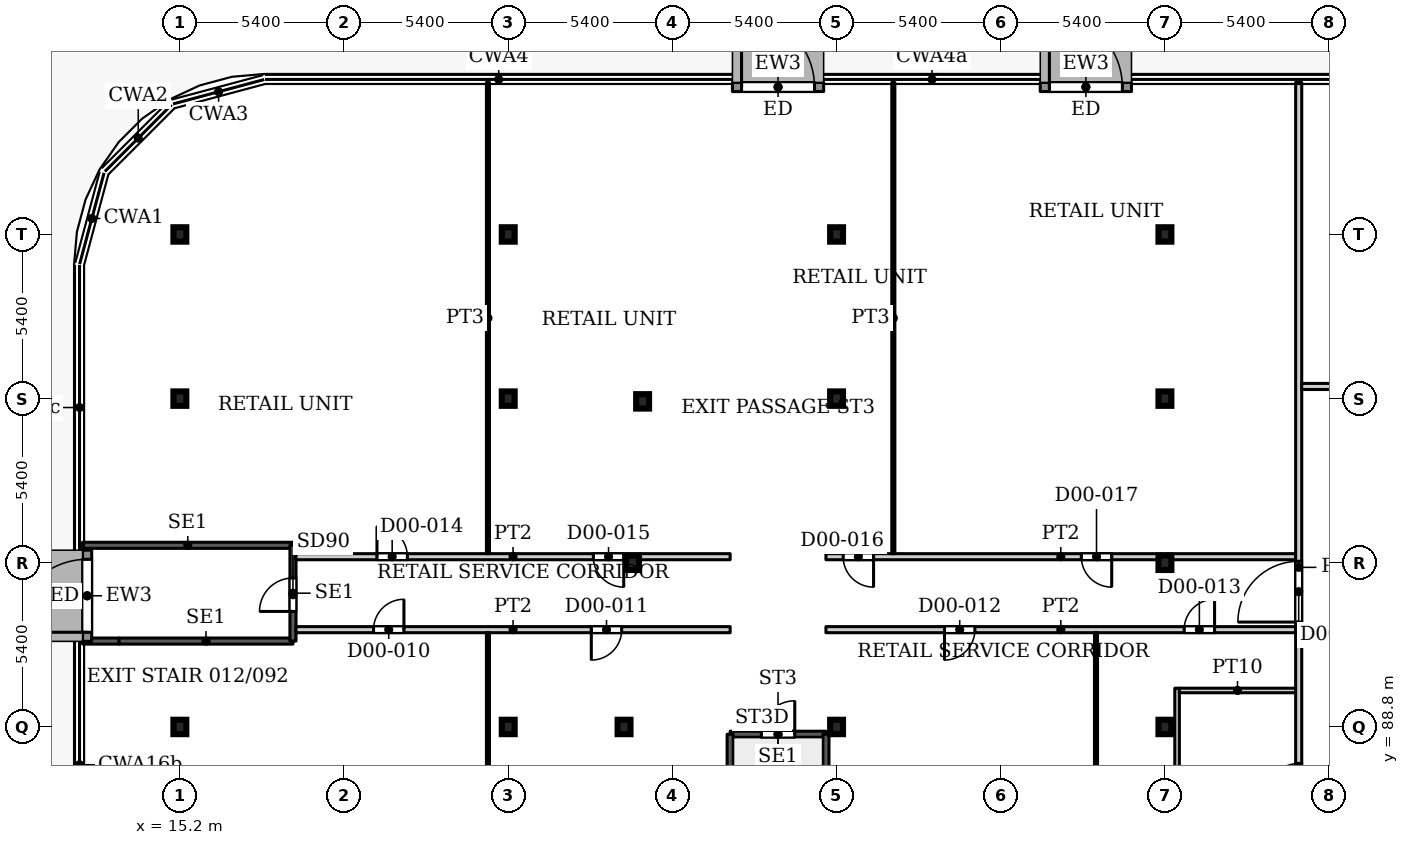
"""IFC4 building model, lengths in metres.
Left out: names, types, materials, properties, quantities, classifications, styles, units other than length and angle.
Written with IfcOpenShell. Run it as: python <this file> out.ifc"""

import sys

from ifc_helpers import new_model, si_unit, direction, frame, frame_2d, origin, origin_2d, place, context, subcontext, project, spatial, rectangle, i_section, extrude, source, transform, mapped, element, fill, save


model = new_model("IFC4")
c1 = context("Model", 3, precision=1e-05, world=origin(), true_north=direction((0.0, 1.0)))
c2 = subcontext(c1, "Body", "Model", "MODEL_VIEW")
j1 = project(units=[si_unit("LENGTHUNIT", "METRE"), si_unit("PLANEANGLEUNIT", "RADIAN")], contexts=[c1])
p1 = place(None, origin())
s1 = spatial("IfcSite", under=j1, at=p1, CompositionType="ELEMENT")
p2 = place(p1, origin())
s2 = spatial("IfcBuilding", under=s1, at=p2, CompositionType="ELEMENT")
p3 = place(p2, origin())
s3 = spatial("IfcBuildingStorey", under=s2, at=p3, CompositionType="ELEMENT", Elevation=0.0)
for number, where, z_axis, x_axis in (
    (1, (15.2, 88.8, 0.0), (0.0, 0.0, 1.0), (1.0, 0.0, 0.0)),
    (2, (26.0, 88.8, 0.0), (0.0, 0.0, 1.0), (1.0, 0.0, 0.0)),
    (3, (36.8, 88.8, 0.0), (0.0, 0.0, 1.0), (1.0, 0.0, 0.0)),
    (4, (47.6, 88.8, 0.0), (0.0, 0.0, 1.0), (1.0, 0.0, 0.0)),
    (5, (15.2, 99.6, 0.0), (0.0, 0.0, 1.0), (1.0, 0.0, 0.0)),
    (6, (26.0, 99.6, 0.0), (0.0, 0.0, 1.0), (1.0, 0.0, 0.0)),
    (7, (36.8, 99.6, 0.0), (0.0, 0.0, 1.0), (1.0, 0.0, 0.0)),
    (8, (47.6, 99.6, 0.0), (0.0, 0.0, 1.0), (1.0, 0.0, 0.0)),
    (9, (15.2, 105.0, 0.0), (0.0, 0.0, 1.0), (1.0, 0.0, 0.0)),
    (10, (26.0, 105.0, 0.0), (0.0, 0.0, 1.0), (1.0, 0.0, 0.0)),
    (11, (36.8, 105.0, 0.0), (0.0, 0.0, 1.0), (1.0, 0.0, 0.0)),
    (12, (47.6, 105.0, 0.0), (0.0, 0.0, 1.0), (1.0, 0.0, 0.0)),
    (13, (29.81, 88.8, 0.0), (0.0, 0.0, 1.0), (1.0, 0.0, 0.0)),
    (14, (30.09, 94.2, 0.0), (0.0, 0.0, 1.0), (1.0, 0.0, 0.0)),
    (15, (47.6, 94.2, 0.0), (0.0, 0.0, 1.0), (1.0, 0.0, 0.0)),
    (16, (30.42, 99.51, 0.0), (0.0, 0.0, 1.0), (1.0, 0.0, 0.0)),
):
    element("IfcColumn", number, at=place(p3, frame(where, z_axis=z_axis, x_axis=x_axis)), inside=s3, PredefinedType="COLUMN", context=c2, shape_type="SweptSolid", body=[
        extrude(i_section(OverallWidth=0.424, OverallDepth=0.474, WebThickness=0.048, FlangeThickness=0.077, FilletRadius=0.014, at=origin_2d()), origin(), (0.0, 0.0, 1.0), 7.5),
    ])
p4 = place(p3, frame((33.375, 109.85, 0.0), z_axis=(0.0, 0.0, 1.0), x_axis=(1.0, 0.0, 0.0)))
e17 = element("IfcWall", 17, at=p4, inside=s3, PredefinedType="SOLIDWALL", context=c2, shape_type="SweptSolid", body=[
    extrude(rectangle(XDim=3.0, YDim=0.3, at=frame_2d((1.5, 0.0))), origin(), (0.0, 0.0, 1.0), 7.25),
])
p5 = place(p4, frame((0.3, 0.0, 0.0)))
e18 = element("IfcOpeningElement", 18, at=p5, cuts=e17, PredefinedType="OPENING", context=c2, shape_type="SweptSolid", body=[
    extrude(rectangle(XDim=2.4, YDim=2.7, at=frame_2d((1.2, 1.35))), frame((0.0, 0.16, 0.0), z_axis=(0.0, -1.0, 0.0), x_axis=(1.0, 0.0, 0.0)), (0.0, 0.0, 1.0), 0.32),
])
p6 = place(p3, frame((43.5, 109.85, 0.0), z_axis=(0.0, 0.0, 1.0), x_axis=(1.0, 0.0, 0.0)))
e19 = element("IfcWall", 19, at=p6, inside=s3, PredefinedType="SOLIDWALL", context=c2, shape_type="SweptSolid", body=[
    extrude(rectangle(XDim=3.0, YDim=0.3, at=frame_2d((1.5, 0.0))), origin(), (0.0, 0.0, 1.0), 7.25),
])
p7 = place(p6, frame((0.3, 0.0, 0.0)))
e20 = element("IfcOpeningElement", 20, at=p7, cuts=e19, PredefinedType="OPENING", context=c2, shape_type="SweptSolid", body=[
    extrude(rectangle(XDim=2.4, YDim=2.7, at=frame_2d((1.2, 1.35))), frame((0.0, 0.16, 0.0), z_axis=(0.0, -1.0, 0.0), x_axis=(1.0, 0.0, 0.0)), (0.0, 0.0, 1.0), 0.32),
])
p8 = place(p3, frame((12.15, 91.615, 0.0), z_axis=(0.0, 0.0, 1.0), x_axis=(0.0, 1.0, 0.0)))
e21 = element("IfcWall", 21, at=p8, inside=s3, PredefinedType="SOLIDWALL", context=c2, shape_type="SweptSolid", body=[
    extrude(rectangle(XDim=3.0, YDim=0.3, at=frame_2d((1.5, 0.0))), origin(), (0.0, 0.0, 1.0), 7.25),
])
p9 = place(p8, frame((0.3, 0.0, 0.0)))
e22 = element("IfcOpeningElement", 22, at=p9, cuts=e21, PredefinedType="OPENING", context=c2, shape_type="SweptSolid", body=[
    extrude(rectangle(XDim=2.4, YDim=2.7, at=frame_2d((1.2, 1.35))), frame((0.0, 0.16, 0.0), z_axis=(0.0, -1.0, 0.0), x_axis=(1.0, 0.0, 0.0)), (0.0, 0.0, 1.0), 0.32),
])
p10 = place(p3, frame((33.3, 88.56, 0.0), z_axis=(0.0, 0.0, 1.0), x_axis=(1.0, 0.0, 0.0)))
e23 = element("IfcWall", 23, at=p10, inside=s3, PredefinedType="SHEAR", context=c2, shape_type="SweptSolid", body=[
    extrude(rectangle(XDim=3.15, YDim=0.2, at=frame_2d((1.575, 0.0))), origin(), (0.0, 0.0, 1.0), 7.5),
])
p11 = place(p10, frame((1.025, 0.0, 0.0)))
e24 = element("IfcOpeningElement", 24, at=p11, cuts=e23, PredefinedType="OPENING", context=c2, shape_type="SweptSolid", body=[
    extrude(rectangle(XDim=1.1, YDim=2.2, at=frame_2d((0.55, 1.1))), frame((0.0, 0.11, 0.0), z_axis=(0.0, -1.0, 0.0), x_axis=(1.0, 0.0, 0.0)), (0.0, 0.0, 1.0), 0.22),
])
for number, where, z_axis, x_axis in (
    (25, (33.3, 79.4, 0.0), (0.0, 0.0, 1.0), (0.0, 1.0, 0.0)),
    (26, (36.45, 79.4, 0.0), (0.0, 0.0, 1.0), (0.0, 1.0, 0.0)),
):
    element("IfcWall", number, at=place(p3, frame(where, z_axis=z_axis, x_axis=x_axis)), inside=s3, PredefinedType="SHEAR", context=c2, shape_type="SweptSolid", body=[
        extrude(rectangle(XDim=9.16, YDim=0.2, at=frame_2d((4.58, 0.0))), origin(), (0.0, 0.0, 1.0), 7.5),
    ])
p12 = place(p3, frame((12.0, 91.625, 0.0), z_axis=(0.0, 0.0, 1.0), x_axis=(1.0, 0.0, 0.0)))
e27 = element("IfcWall", 27, at=p12, inside=s3, PredefinedType="SHEAR", context=c2, shape_type="SweptSolid", body=[
    extrude(rectangle(XDim=1.2, YDim=0.2, at=frame_2d((0.6, 0.0))), origin(), (0.0, 0.0, 1.0), 7.5),
])
p13 = place(p3, frame((13.2, 91.625, 0.0), z_axis=(0.0, 0.0, 1.0), x_axis=(1.0, 0.0, 0.0)))
e28 = element("IfcWall", 28, at=p13, inside=s3, PredefinedType="SHEAR", context=c2, shape_type="SweptSolid", body=[
    extrude(rectangle(XDim=5.72, YDim=0.2, at=frame_2d((2.86, 0.0))), origin(), (0.0, 0.0, 1.0), 7.5),
])
p14 = place(p3, frame((12.0, 94.775, 0.0), z_axis=(0.0, 0.0, 1.0), x_axis=(1.0, 0.0, 0.0)))
e29 = element("IfcWall", 29, at=p14, inside=s3, PredefinedType="SHEAR", context=c2, shape_type="SweptSolid", body=[
    extrude(rectangle(XDim=6.92, YDim=0.2, at=frame_2d((3.46, 0.0))), origin(), (0.0, 0.0, 1.0), 7.5),
])
p15 = place(p3, frame((18.92, 91.625, 0.0), z_axis=(0.0, 0.0, 1.0), x_axis=(0.0, 1.0, 0.0)))
e30 = element("IfcWall", 30, at=p15, inside=s3, PredefinedType="SHEAR", context=c2, shape_type="SweptSolid", body=[
    extrude(rectangle(XDim=3.15, YDim=0.2, at=frame_2d((1.575, 0.0))), origin(), (0.0, 0.0, 1.0), 7.5),
])
p16 = place(p15, frame((0.975, 0.0, 0.0)))
e31 = element("IfcOpeningElement", 31, at=p16, cuts=e30, PredefinedType="OPENING", context=c2, shape_type="SweptSolid", body=[
    extrude(rectangle(XDim=1.1, YDim=2.2, at=frame_2d((0.55, 1.1))), frame((0.0, 0.11, 0.0), z_axis=(0.0, -1.0, 0.0), x_axis=(1.0, 0.0, 0.0)), (0.0, 0.0, 1.0), 0.22),
])
p17 = place(p3, frame((19.019, 92.0, 0.0), z_axis=(0.0, 0.0, 1.0), x_axis=(1.0, 0.0, 0.0)))
e32 = element("IfcWall", 32, at=p17, inside=s3, PredefinedType="PARTITIONING", context=c2, shape_type="SweptSolid", body=[
    extrude(rectangle(XDim=14.281, YDim=0.2, at=frame_2d((7.141, 0.0))), origin(), (0.0, 0.0, 1.0), 7.08),
])
p18 = place(p17, frame((2.551, 0.0, 0.0)))
e33 = element("IfcOpeningElement", 33, at=p18, cuts=e32, PredefinedType="OPENING", context=c2, shape_type="SweptSolid", body=[
    extrude(rectangle(XDim=1.0, YDim=2.1, at=frame_2d((0.5, 1.05))), frame((0.0, 0.11, 0.0), z_axis=(0.0, -1.0, 0.0), x_axis=(1.0, 0.0, 0.0)), (0.0, 0.0, 1.0), 0.22),
])
p19 = place(p17, frame((9.714, 0.0, 0.0)))
e34 = element("IfcOpeningElement", 34, at=p19, cuts=e32, PredefinedType="OPENING", context=c2, shape_type="SweptSolid", body=[
    extrude(rectangle(XDim=1.0, YDim=2.1, at=frame_2d((0.5, 1.05))), frame((0.0, 0.11, 0.0), z_axis=(0.0, -1.0, 0.0), x_axis=(1.0, 0.0, 0.0)), (0.0, 0.0, 1.0), 0.22),
])
p20 = place(p3, frame((19.019, 94.4, 0.0), z_axis=(0.0, 0.0, 1.0), x_axis=(1.0, 0.0, 0.0)))
e35 = element("IfcWall", 35, at=p20, inside=s3, PredefinedType="PARTITIONING", context=c2, shape_type="SweptSolid", body=[
    extrude(rectangle(XDim=14.281, YDim=0.2, at=frame_2d((7.141, 0.0))), origin(), (0.0, 0.0, 1.0), 7.08),
])
p21 = place(p20, frame((2.664, 0.0, 0.0)))
e36 = element("IfcOpeningElement", 36, at=p21, cuts=e35, PredefinedType="OPENING", context=c2, shape_type="SweptSolid", body=[
    extrude(rectangle(XDim=1.0, YDim=2.1, at=frame_2d((0.5, 1.05))), frame((0.0, 0.11, 0.0), z_axis=(0.0, -1.0, 0.0), x_axis=(1.0, 0.0, 0.0)), (0.0, 0.0, 1.0), 0.22),
])
p22 = place(p20, frame((9.781, 0.0, 0.0)))
e37 = element("IfcOpeningElement", 37, at=p22, cuts=e35, PredefinedType="OPENING", context=c2, shape_type="SweptSolid", body=[
    extrude(rectangle(XDim=1.0, YDim=2.1, at=frame_2d((0.5, 1.05))), frame((0.0, 0.11, 0.0), z_axis=(0.0, -1.0, 0.0), x_axis=(1.0, 0.0, 0.0)), (0.0, 0.0, 1.0), 0.22),
])
p23 = place(p3, frame((25.333, 80.05, 0.0), z_axis=(0.0, 0.0, 1.0), x_axis=(0.0, 1.0, 0.0)))
e38 = element("IfcWall", 38, at=p23, inside=s3, PredefinedType="PARTITIONING", context=c2, shape_type="SweptSolid", body=[
    extrude(rectangle(XDim=11.85, YDim=0.1, at=frame_2d((5.925, 0.0))), origin(), (0.0, 0.0, 1.0), 7.08),
])
p24 = place(p3, frame((25.333, 94.5, 0.0), z_axis=(0.0, 0.0, 1.0), x_axis=(0.0, 1.0, 0.0)))
e39 = element("IfcWall", 39, at=p24, inside=s3, PredefinedType="PARTITIONING", context=c2, shape_type="SweptSolid", body=[
    extrude(rectangle(XDim=15.5, YDim=0.1, at=frame_2d((7.75, 0.0))), origin(), (0.0, 0.0, 1.0), 7.08),
])
p25 = place(p3, frame((36.45, 92.0, 0.0), z_axis=(0.0, 0.0, 1.0), x_axis=(1.0, 0.0, 0.0)))
e40 = element("IfcWall", 40, at=p25, inside=s3, PredefinedType="PARTITIONING", context=c2, shape_type="SweptSolid", body=[
    extrude(rectangle(XDim=15.45, YDim=0.2, at=frame_2d((7.725, 0.0))), origin(), (0.0, 0.0, 1.0), 7.08),
])
p26 = place(p25, frame((3.9, 0.0, 0.0)))
e41 = element("IfcOpeningElement", 41, at=p26, cuts=e40, PredefinedType="OPENING", context=c2, shape_type="SweptSolid", body=[
    extrude(rectangle(XDim=1.0, YDim=2.1, at=frame_2d((0.5, 1.05))), frame((0.0, 0.11, 0.0), z_axis=(0.0, -1.0, 0.0), x_axis=(1.0, 0.0, 0.0)), (0.0, 0.0, 1.0), 0.22),
])
p27 = place(p25, frame((11.783, 0.0, 0.0)))
e42 = element("IfcOpeningElement", 42, at=p27, cuts=e40, PredefinedType="OPENING", context=c2, shape_type="SweptSolid", body=[
    extrude(rectangle(XDim=1.0, YDim=2.1, at=frame_2d((0.5, 1.05))), frame((0.0, 0.11, 0.0), z_axis=(0.0, -1.0, 0.0), x_axis=(1.0, 0.0, 0.0)), (0.0, 0.0, 1.0), 0.22),
])
p28 = place(p3, frame((36.45, 94.4, 0.0), z_axis=(0.0, 0.0, 1.0), x_axis=(1.0, 0.0, 0.0)))
e43 = element("IfcWall", 43, at=p28, inside=s3, PredefinedType="PARTITIONING", context=c2, shape_type="SweptSolid", body=[
    extrude(rectangle(XDim=15.45, YDim=0.2, at=frame_2d((7.725, 0.0))), origin(), (0.0, 0.0, 1.0), 7.08),
])
p29 = place(p28, frame((0.567, 0.0, 0.0)))
e44 = element("IfcOpeningElement", 44, at=p29, cuts=e43, PredefinedType="OPENING", context=c2, shape_type="SweptSolid", body=[
    extrude(rectangle(XDim=1.0, YDim=2.1, at=frame_2d((0.5, 1.05))), frame((0.0, 0.11, 0.0), z_axis=(0.0, -1.0, 0.0), x_axis=(1.0, 0.0, 0.0)), (0.0, 0.0, 1.0), 0.22),
])
p30 = place(p28, frame((8.4, 0.0, 0.0)))
e45 = element("IfcOpeningElement", 45, at=p30, cuts=e43, PredefinedType="OPENING", context=c2, shape_type="SweptSolid", body=[
    extrude(rectangle(XDim=1.0, YDim=2.1, at=frame_2d((0.5, 1.05))), frame((0.0, 0.11, 0.0), z_axis=(0.0, -1.0, 0.0), x_axis=(1.0, 0.0, 0.0)), (0.0, 0.0, 1.0), 0.22),
])
p31 = place(p3, frame((38.667, 94.5, 0.0), z_axis=(0.0, 0.0, 1.0), x_axis=(0.0, 1.0, 0.0)))
e46 = element("IfcWall", 46, at=p31, inside=s3, PredefinedType="PARTITIONING", context=c2, shape_type="SweptSolid", body=[
    extrude(rectangle(XDim=15.5, YDim=0.1, at=frame_2d((7.75, 0.0))), origin(), (0.0, 0.0, 1.0), 7.08),
])
p32 = place(p3, frame((45.333, 79.95, 0.0), z_axis=(0.0, 0.0, 1.0), x_axis=(0.0, 1.0, 0.0)))
e47 = element("IfcWall", 47, at=p32, inside=s3, PredefinedType="PARTITIONING", context=c2, shape_type="SweptSolid", body=[
    extrude(rectangle(XDim=11.95, YDim=0.1, at=frame_2d((5.975, 0.0))), origin(), (0.0, 0.0, 1.0), 7.08),
])
p33 = place(p3, frame((48.0, 72.0, 0.0), z_axis=(0.0, 0.0, 1.0), x_axis=(0.0, 1.0, 0.0)))
e48 = element("IfcWall", 48, at=p33, inside=s3, PredefinedType="PARTITIONING", context=c2, shape_type="SweptSolid", body=[
    extrude(rectangle(XDim=18.075, YDim=0.15, at=frame_2d((9.038, 0.0))), origin(), (0.0, 0.0, 1.0), 7.08),
])
p34 = place(p3, frame((48.075, 90.0, 0.0), z_axis=(0.0, 0.0, 1.0), x_axis=(1.0, 0.0, 0.0)))
e49 = element("IfcWall", 49, at=p34, inside=s3, PredefinedType="PARTITIONING", context=c2, shape_type="SweptSolid", body=[
    extrude(rectangle(XDim=3.825, YDim=0.15, at=frame_2d((1.913, 0.0))), origin(), (0.0, 0.0, 1.0), 7.08),
])
p35 = place(p3, frame((52.0, 78.1, 0.0), z_axis=(0.0, 0.0, 1.0), x_axis=(0.0, 1.0, 0.0)))
e50 = element("IfcWall", 50, at=p35, inside=s3, PredefinedType="PARTITIONING", context=c2, shape_type="SweptSolid", body=[
    extrude(rectangle(XDim=31.9, YDim=0.2, at=frame_2d((15.95, 0.0))), origin(), (0.0, 0.0, 1.0), 7.08),
])
p36 = place(p35, frame((14.15, 0.0, 0.0)))
e51 = element("IfcOpeningElement", 51, at=p36, cuts=e50, PredefinedType="OPENING", context=c2, shape_type="SweptSolid", body=[
    extrude(rectangle(XDim=2.0, YDim=2.1, at=frame_2d((1.0, 1.05))), frame((0.0, 0.11, 0.0), z_axis=(0.0, -1.0, 0.0), x_axis=(1.0, 0.0, 0.0)), (0.0, 0.0, 1.0), 0.22),
])
p37 = place(p35, frame((8.5, 0.0, 0.0)))
e52 = element("IfcOpeningElement", 52, at=p37, cuts=e50, PredefinedType="OPENING", context=c2, shape_type="SweptSolid", body=[
    extrude(rectangle(XDim=1.0, YDim=2.1, at=frame_2d((0.5, 1.05))), frame((0.0, 0.11, 0.0), z_axis=(0.0, -1.0, 0.0), x_axis=(1.0, 0.0, 0.0)), (0.0, 0.0, 1.0), 0.22),
])
p38 = place(p3, frame((52.1, 100.0, 0.0), z_axis=(0.0, 0.0, 1.0), x_axis=(1.0, 0.0, 0.0)))
e53 = element("IfcWall", 53, at=p38, inside=s3, PredefinedType="PARTITIONING", context=c2, shape_type="SweptSolid", body=[
    extrude(rectangle(XDim=5.8, YDim=0.2, at=frame_2d((2.9, 0.0))), origin(), (0.0, 0.0, 1.0), 7.08),
])
p39 = place(p38, frame((1.8, 0.0, 0.0)))
e54 = element("IfcOpeningElement", 54, at=p39, cuts=e53, PredefinedType="OPENING", context=c2, shape_type="SweptSolid", body=[
    extrude(rectangle(XDim=2.4, YDim=2.1, at=frame_2d((1.2, 1.05))), frame((0.0, 0.11, 0.0), z_axis=(0.0, -1.0, 0.0), x_axis=(1.0, 0.0, 0.0)), (0.0, 0.0, 1.0), 0.22),
])
m1 = source(origin(), c2, "Body", "SweptSolid", [
    extrude(rectangle(XDim=2.4, YDim=2.7, at=frame_2d((1.2, 1.35))), frame((0.0, 0.025, 0.0), z_axis=(0.0, -1.0, 0.0), x_axis=(1.0, 0.0, 0.0)), (0.0, 0.0, 1.0), 0.05),
])
p40 = place(p5, origin())
e55 = element("IfcDoor", 55, at=p40, inside=s3, OperationType="DOUBLE_DOOR_SINGLE_SWING", PredefinedType="DOOR", context=c2, shape_type="MappedRepresentation", body=[
    mapped(m1, transform((0.0, 0.0, 0.0), x_axis=(1.0, 0.0, 0.0), y_axis=(0.0, 1.0, 0.0), z_axis=(0.0, 0.0, 1.0), scale=1.0)),
])
fill(e18, e55)
p41 = place(p7, origin())
e56 = element("IfcDoor", 56, at=p41, inside=s3, OperationType="DOUBLE_DOOR_SINGLE_SWING", PredefinedType="DOOR", context=c2, shape_type="MappedRepresentation", body=[
    mapped(m1, transform((0.0, 0.0, 0.0), x_axis=(1.0, 0.0, 0.0), y_axis=(0.0, 1.0, 0.0), z_axis=(0.0, 0.0, 1.0), scale=1.0)),
])
fill(e20, e56)
p42 = place(p9, origin())
e57 = element("IfcDoor", 57, at=p42, inside=s3, OperationType="DOUBLE_DOOR_SINGLE_SWING", PredefinedType="DOOR", context=c2, shape_type="MappedRepresentation", body=[
    mapped(m1, transform((0.0, 0.0, 0.0), x_axis=(1.0, 0.0, 0.0), y_axis=(0.0, 1.0, 0.0), z_axis=(0.0, 0.0, 1.0), scale=1.0)),
])
fill(e22, e57)
m2 = source(origin(), c2, "Body", "SweptSolid", [
    extrude(rectangle(XDim=1.1, YDim=2.2, at=frame_2d((0.55, 1.1))), frame((0.0, 0.025, 0.0), z_axis=(0.0, -1.0, 0.0), x_axis=(1.0, 0.0, 0.0)), (0.0, 0.0, 1.0), 0.05),
])
p43 = place(p16, origin())
e58 = element("IfcDoor", 58, at=p43, inside=s3, OperationType="SINGLE_SWING_LEFT", PredefinedType="DOOR", context=c2, shape_type="MappedRepresentation", body=[
    mapped(m2, transform((0.0, 0.0, 0.0), x_axis=(1.0, 0.0, 0.0), y_axis=(0.0, 1.0, 0.0), z_axis=(0.0, 0.0, 1.0), scale=1.0)),
])
fill(e31, e58)
p44 = place(p11, origin())
e59 = element("IfcDoor", 59, at=p44, inside=s3, OperationType="SINGLE_SWING_LEFT", PredefinedType="DOOR", context=c2, shape_type="MappedRepresentation", body=[
    mapped(m2, transform((0.0, 0.0, 0.0), x_axis=(1.0, 0.0, 0.0), y_axis=(0.0, 1.0, 0.0), z_axis=(0.0, 0.0, 1.0), scale=1.0)),
])
fill(e24, e59)
m3 = source(origin(), c2, "Body", "SweptSolid", [
    extrude(rectangle(XDim=1.0, YDim=2.1, at=frame_2d((0.5, 1.05))), frame((0.0, 0.025, 0.0), z_axis=(0.0, -1.0, 0.0), x_axis=(1.0, 0.0, 0.0)), (0.0, 0.0, 1.0), 0.05),
])
p45 = place(p18, origin())
e60 = element("IfcDoor", 60, at=p45, inside=s3, OperationType="SINGLE_SWING_LEFT", PredefinedType="DOOR", context=c2, shape_type="MappedRepresentation", body=[
    mapped(m3, transform((0.0, 0.0, 0.0), x_axis=(1.0, 0.0, 0.0), y_axis=(0.0, 1.0, 0.0), z_axis=(0.0, 0.0, 1.0), scale=1.0)),
])
fill(e33, e60)
p46 = place(p19, origin())
e61 = element("IfcDoor", 61, at=p46, inside=s3, OperationType="SINGLE_SWING_RIGHT", PredefinedType="DOOR", context=c2, shape_type="MappedRepresentation", body=[
    mapped(m3, transform((0.0, 0.0, 0.0), x_axis=(1.0, 0.0, 0.0), y_axis=(0.0, 1.0, 0.0), z_axis=(0.0, 0.0, 1.0), scale=1.0)),
])
fill(e34, e61)
p47 = place(p26, origin())
e62 = element("IfcDoor", 62, at=p47, inside=s3, OperationType="SINGLE_SWING_RIGHT", PredefinedType="DOOR", context=c2, shape_type="MappedRepresentation", body=[
    mapped(m3, transform((0.0, 0.0, 0.0), x_axis=(1.0, 0.0, 0.0), y_axis=(0.0, 1.0, 0.0), z_axis=(0.0, 0.0, 1.0), scale=1.0)),
])
fill(e41, e62)
p48 = place(p27, origin())
e63 = element("IfcDoor", 63, at=p48, inside=s3, OperationType="SINGLE_SWING_LEFT", PredefinedType="DOOR", context=c2, shape_type="MappedRepresentation", body=[
    mapped(m3, transform((0.0, 0.0, 0.0), x_axis=(1.0, 0.0, 0.0), y_axis=(0.0, 1.0, 0.0), z_axis=(0.0, 0.0, 1.0), scale=1.0)),
])
fill(e42, e63)
p49 = place(p21, origin())
e64 = element("IfcDoor", 64, at=p49, inside=s3, OperationType="SINGLE_SWING_LEFT", PredefinedType="DOOR", context=c2, shape_type="MappedRepresentation", body=[
    mapped(m3, transform((0.0, 0.0, 0.0), x_axis=(1.0, 0.0, 0.0), y_axis=(0.0, 1.0, 0.0), z_axis=(0.0, 0.0, 1.0), scale=1.0)),
])
fill(e36, e64)
p50 = place(p22, origin())
e65 = element("IfcDoor", 65, at=p50, inside=s3, OperationType="SINGLE_SWING_RIGHT", PredefinedType="DOOR", context=c2, shape_type="MappedRepresentation", body=[
    mapped(m3, transform((0.0, 0.0, 0.0), x_axis=(1.0, 0.0, 0.0), y_axis=(0.0, 1.0, 0.0), z_axis=(0.0, 0.0, 1.0), scale=1.0)),
])
fill(e37, e65)
p51 = place(p29, origin())
e66 = element("IfcDoor", 66, at=p51, inside=s3, OperationType="SINGLE_SWING_RIGHT", PredefinedType="DOOR", context=c2, shape_type="MappedRepresentation", body=[
    mapped(m3, transform((0.0, 0.0, 0.0), x_axis=(1.0, 0.0, 0.0), y_axis=(0.0, 1.0, 0.0), z_axis=(0.0, 0.0, 1.0), scale=1.0)),
])
fill(e44, e66)
p52 = place(p30, origin())
e67 = element("IfcDoor", 67, at=p52, inside=s3, OperationType="SINGLE_SWING_RIGHT", PredefinedType="DOOR", context=c2, shape_type="MappedRepresentation", body=[
    mapped(m3, transform((0.0, 0.0, 0.0), x_axis=(1.0, 0.0, 0.0), y_axis=(0.0, 1.0, 0.0), z_axis=(0.0, 0.0, 1.0), scale=1.0)),
])
fill(e45, e67)
m4 = source(origin(), c2, "Body", "SweptSolid", [
    extrude(rectangle(XDim=2.0, YDim=2.1, at=frame_2d((1.0, 1.05))), frame((0.0, 0.025, 0.0), z_axis=(0.0, -1.0, 0.0), x_axis=(1.0, 0.0, 0.0)), (0.0, 0.0, 1.0), 0.05),
])
p53 = place(p36, origin())
e68 = element("IfcDoor", 68, at=p53, inside=s3, OperationType="DOUBLE_DOOR_SINGLE_SWING", PredefinedType="DOOR", context=c2, shape_type="MappedRepresentation", body=[
    mapped(m4, transform((0.0, 0.0, 0.0), x_axis=(1.0, 0.0, 0.0), y_axis=(0.0, 1.0, 0.0), z_axis=(0.0, 0.0, 1.0), scale=1.0)),
])
fill(e51, e68)
p54 = place(p37, origin())
e69 = element("IfcDoor", 69, at=p54, inside=s3, OperationType="SINGLE_SWING_LEFT", PredefinedType="DOOR", context=c2, shape_type="MappedRepresentation", body=[
    mapped(m3, transform((0.0, 0.0, 0.0), x_axis=(1.0, 0.0, 0.0), y_axis=(0.0, 1.0, 0.0), z_axis=(0.0, 0.0, 1.0), scale=1.0)),
])
fill(e52, e69)
save(model, sys.argv[1])
